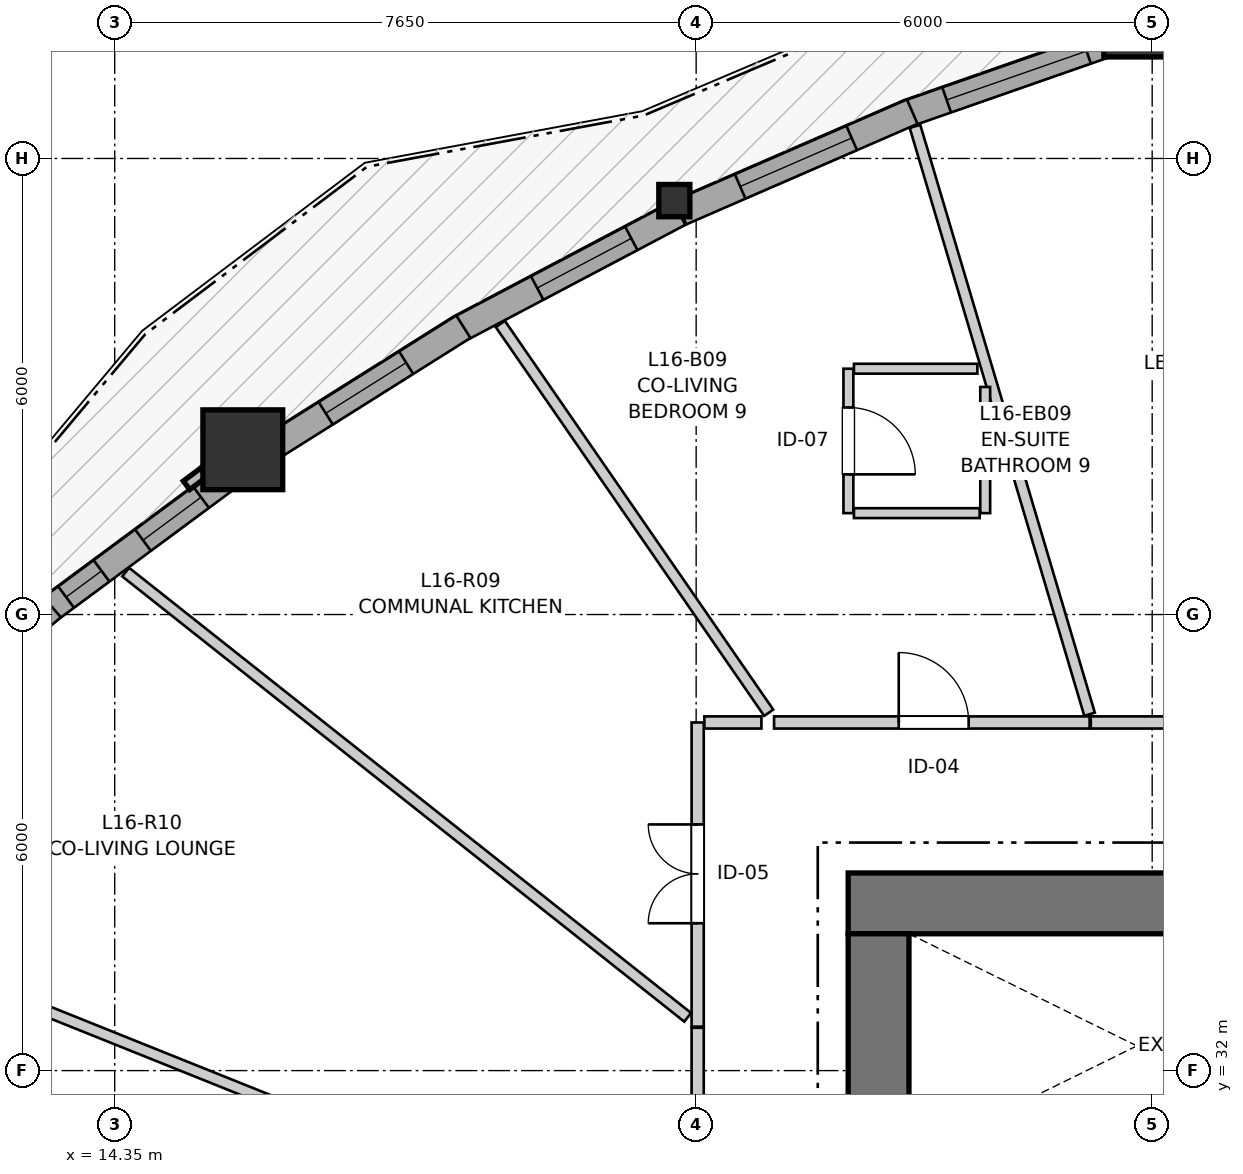
"""IFC4 building model, lengths in metres.
Left out: names, types, materials, properties, quantities, classifications, styles, units other than length and angle.
Written with IfcOpenShell. Run it as: python <this file> out.ifc"""

import sys

from ifc_helpers import new_model, si_unit, direction, frame, frame_2d, origin, origin_2d, place, context, subcontext, project, spatial, rectangle, i_section, extrude, source, transform, mapped, element, fill, save


model = new_model("IFC4")
c1 = context("Model", 3, precision=1e-05, world=origin(), true_north=direction((0.0, 1.0)))
c2 = subcontext(c1, "Body", "Model", "MODEL_VIEW")
j1 = project(units=[si_unit("LENGTHUNIT", "METRE"), si_unit("PLANEANGLEUNIT", "RADIAN")], contexts=[c1])
p1 = place(None, origin())
s1 = spatial("IfcSite", under=j1, at=p1, CompositionType="ELEMENT")
p2 = place(p1, origin())
s2 = spatial("IfcBuilding", under=s1, at=p2, CompositionType="ELEMENT")
p3 = place(p2, frame((0.0, 0.0, 55.8)))
s3 = spatial("IfcBuildingStorey", under=s2, at=p3, CompositionType="ELEMENT", Elevation=55.8)
p4 = place(p3, frame((36.7, 34.2, 0.0), z_axis=(0.0, 0.0, 1.0), x_axis=(-1.0, 0.0, 0.0)))
e1 = element("IfcWall", 1, at=p4, inside=s3, PredefinedType="SHEAR", context=c2, shape_type="SweptSolid", body=[
    extrude(rectangle(XDim=12.7, YDim=0.8, at=frame_2d((6.35, 0.0))), origin(), (0.0, 0.0, 1.0), 2.94),
])
p5 = place(p3, frame((24.4, 33.8, 0.0), z_axis=(0.0, 0.0, 1.0), x_axis=(0.0, -1.0, 0.0)))
e2 = element("IfcWall", 2, at=p5, inside=s3, PredefinedType="SHEAR", context=c2, shape_type="SweptSolid", body=[
    extrude(rectangle(XDim=15.6, YDim=0.8, at=frame_2d((7.8, 0.0))), origin(), (0.0, 0.0, 1.0), 2.94),
])
p6 = place(p5, frame((7.05, 0.0, 0.0)))
e3 = element("IfcOpeningElement", 3, at=p6, cuts=e2, PredefinedType="OPENING", context=c2, shape_type="SweptSolid", body=[
    extrude(rectangle(XDim=1.5, YDim=2.15, at=frame_2d((0.75, 1.075))), frame((0.0, 0.41, 0.0), z_axis=(0.0, -1.0, 0.0), x_axis=(1.0, 0.0, 0.0)), (0.0, 0.0, 1.0), 0.82),
])
p7 = place(p5, frame((3.52, 0.0, 0.0)))
e4 = element("IfcOpeningElement", 4, at=p7, cuts=e2, PredefinedType="OPENING", context=c2, shape_type="SweptSolid", body=[
    extrude(rectangle(XDim=0.86, YDim=2.05, at=frame_2d((0.43, 1.025))), frame((0.0, 0.41, 0.0), z_axis=(0.0, -1.0, 0.0), x_axis=(1.0, 0.0, 0.0)), (0.0, 0.0, 1.0), 0.82),
])
p8 = place(p5, frame((11.22, 0.0, 0.0)))
e5 = element("IfcOpeningElement", 5, at=p8, cuts=e2, PredefinedType="OPENING", context=c2, shape_type="SweptSolid", body=[
    extrude(rectangle(XDim=0.86, YDim=2.05, at=frame_2d((0.43, 1.025))), frame((0.0, 0.41, 0.0), z_axis=(0.0, -1.0, 0.0), x_axis=(1.0, 0.0, 0.0)), (0.0, 0.0, 1.0), 0.82),
])
m1 = source(origin(), c2, "Body", "SweptSolid", [
    extrude(rectangle(XDim=1.05, YDim=1.05, at=origin_2d()), origin(), (0.0, 0.0, 1.0), 2.94),
])
p9 = place(p3, frame((27.888, 45.861, 0.0), z_axis=(0.0, 0.0, 1.0), x_axis=(1.0, 0.0, 0.0)))
e6 = element("IfcColumn", 6, at=p9, inside=s3, PredefinedType="COLUMN", context=c2, shape_type="MappedRepresentation", body=[
    mapped(m1, transform((0.0, 0.0, 0.0), x_axis=(1.0, 0.0, 0.0), y_axis=(0.0, 1.0, 0.0), z_axis=(0.0, 0.0, 1.0), scale=1.0)),
])
m2 = source(origin(), c2, "Body", "SweptSolid", [
    extrude(i_section(OverallWidth=0.409, OverallDepth=0.425, WebThickness=0.03, FlangeThickness=0.048, FilletRadius=0.015, at=origin_2d()), origin(), (0.0, 0.0, 1.0), 2.94),
])
p10 = place(p3, frame((21.713, 43.446, 0.0), z_axis=(0.0, 0.0, 1.0), x_axis=(1.0, 0.0, 0.0)))
e7 = element("IfcColumn", 7, at=p10, inside=s3, PredefinedType="PILASTER", context=c2, shape_type="MappedRepresentation", body=[
    mapped(m2, transform((0.0, 0.0, 0.0), x_axis=(1.0, 0.0, 0.0), y_axis=(0.0, 1.0, 0.0), z_axis=(0.0, 0.0, 1.0), scale=1.0)),
])
p11 = place(p3, frame((16.035, 40.168, 0.0), z_axis=(0.0, 0.0, 1.0), x_axis=(1.0, 0.0, 0.0)))
e8 = element("IfcColumn", 8, at=p11, inside=s3, PredefinedType="COLUMN", context=c2, shape_type="MappedRepresentation", body=[
    mapped(m1, transform((0.0, 0.0, 0.0), x_axis=(1.0, 0.0, 0.0), y_axis=(0.0, 1.0, 0.0), z_axis=(0.0, 0.0, 1.0), scale=1.0)),
])
p12 = place(p3, frame((27.663, 45.596, 0.0), z_axis=(0.0, 0.0, 1.0), x_axis=(-0.944134113087, -0.329561491236, 0.0)))
e9 = element("IfcWall", 9, at=p12, inside=s3, PredefinedType="SOLIDWALL", context=c2, shape_type="SweptSolid", body=[
    extrude(rectangle(XDim=3.074, YDim=0.35, at=frame_2d((1.537, 0.0))), origin(), (0.0, 0.0, 1.0), 2.42),
])
p13 = place(p12, frame((0.557, 0.0, 0.82)))
e10 = element("IfcOpeningElement", 10, at=p13, cuts=e9, PredefinedType="OPENING", context=c2, shape_type="SweptSolid", body=[
    extrude(rectangle(XDim=1.95, YDim=1.4, at=frame_2d((0.975, 0.7))), frame((0.0, 0.185, 0.0), z_axis=(0.0, -1.0, 0.0), x_axis=(1.0, 0.0, 0.0)), (0.0, 0.0, 1.0), 0.37),
])
p14 = place(p3, frame((24.843, 44.615, 0.0), z_axis=(0.0, 0.0, 1.0), x_axis=(-0.917119193404, -0.398613076918, 0.0)))
e11 = element("IfcWall", 11, at=p14, inside=s3, PredefinedType="SOLIDWALL", context=c2, shape_type="SweptSolid", body=[
    extrude(rectangle(XDim=3.317, YDim=0.35, at=frame_2d((1.659, 0.0))), origin(), (0.0, 0.0, 1.0), 2.42),
])
p15 = place(p14, frame((0.869, 0.0, 0.82)))
e12 = element("IfcOpeningElement", 12, at=p15, cuts=e11, PredefinedType="OPENING", context=c2, shape_type="SweptSolid", body=[
    extrude(rectangle(XDim=1.6, YDim=1.35, at=frame_2d((0.8, 0.675))), frame((0.0, 0.185, 0.0), z_axis=(0.0, -1.0, 0.0), x_axis=(1.0, 0.0, 0.0)), (0.0, 0.0, 1.0), 0.37),
])
p16 = place(p3, frame((21.777, 43.281, 0.0), z_axis=(0.0, 0.0, 1.0), x_axis=(-0.884381357857, -0.466765052113, 0.0)))
e13 = element("IfcWall", 13, at=p16, inside=s3, PredefinedType="SOLIDWALL", context=c2, shape_type="SweptSolid", body=[
    extrude(rectangle(XDim=3.298, YDim=0.35, at=frame_2d((1.649, 0.0))), origin(), (0.0, 0.0, 1.0), 2.42),
])
p17 = place(p16, frame((0.713, 0.0, 0.82)))
e14 = element("IfcOpeningElement", 14, at=p17, cuts=e13, PredefinedType="OPENING", context=c2, shape_type="SweptSolid", body=[
    extrude(rectangle(XDim=1.4, YDim=1.35, at=frame_2d((0.7, 0.675))), frame((0.0, 0.185, 0.0), z_axis=(0.0, -1.0, 0.0), x_axis=(1.0, 0.0, 0.0)), (0.0, 0.0, 1.0), 0.37),
])
p18 = place(p3, frame((18.937, 41.787, 0.0), z_axis=(0.0, 0.0, 1.0), x_axis=(-0.84639489148, -0.532555807101, 0.0)))
e15 = element("IfcWall", 15, at=p18, inside=s3, PredefinedType="SOLIDWALL", context=c2, shape_type="SweptSolid", body=[
    extrude(rectangle(XDim=3.018, YDim=0.35, at=frame_2d((1.509, 0.0))), origin(), (0.0, 0.0, 1.0), 2.42),
])
p19 = place(p18, frame((0.889, 0.0, 0.82)))
e16 = element("IfcOpeningElement", 16, at=p19, cuts=e15, PredefinedType="OPENING", context=c2, shape_type="SweptSolid", body=[
    extrude(rectangle(XDim=1.25, YDim=1.35, at=frame_2d((0.625, 0.675))), frame((0.0, 0.185, 0.0), z_axis=(0.0, -1.0, 0.0), x_axis=(1.0, 0.0, 0.0)), (0.0, 0.0, 1.0), 0.37),
])
p20 = place(p3, frame((15.898, 39.849, 0.0), z_axis=(0.0, 0.0, 1.0), x_axis=(-0.803775013519, -0.594933380844, 0.0)))
e17 = element("IfcWall", 17, at=p20, inside=s3, PredefinedType="SOLIDWALL", context=c2, shape_type="SweptSolid", body=[
    extrude(rectangle(XDim=3.037, YDim=0.35, at=frame_2d((1.519, 0.0))), origin(), (0.0, 0.0, 1.0), 2.42),
])
p21 = place(p20, frame((0.513, 0.0, 0.82)))
e18 = element("IfcOpeningElement", 18, at=p21, cuts=e17, PredefinedType="OPENING", context=c2, shape_type="SweptSolid", body=[
    extrude(rectangle(XDim=0.95, YDim=1.35, at=frame_2d((0.475, 0.675))), frame((0.0, 0.185, 0.0), z_axis=(0.0, -1.0, 0.0), x_axis=(1.0, 0.0, 0.0)), (0.0, 0.0, 1.0), 0.37),
])
p22 = place(p20, frame((2.142, 0.0, 0.82)))
e19 = element("IfcOpeningElement", 19, at=p22, cuts=e17, PredefinedType="OPENING", context=c2, shape_type="SweptSolid", body=[
    extrude(rectangle(XDim=0.58, YDim=1.35, at=frame_2d((0.29, 0.675))), frame((0.0, 0.185, 0.0), z_axis=(0.0, -1.0, 0.0), x_axis=(1.0, 0.0, 0.0)), (0.0, 0.0, 1.0), 0.37),
])
p23 = place(p3, frame((13.526, 38.097, 0.0), z_axis=(0.0, 0.0, 1.0), x_axis=(-0.757460843483, -0.652880594435, 0.0)))
e20 = element("IfcWall", 20, at=p23, inside=s3, PredefinedType="SOLIDWALL", context=c2, shape_type="SweptSolid", body=[
    extrude(rectangle(XDim=3.355, YDim=0.35, at=frame_2d((1.677, 0.0))), origin(), (0.0, 0.0, 1.0), 2.42),
])
p24 = place(p23, frame((0.962, 0.0, 0.82)))
e21 = element("IfcOpeningElement", 21, at=p24, cuts=e20, PredefinedType="OPENING", context=c2, shape_type="SweptSolid", body=[
    extrude(rectangle(XDim=1.45, YDim=1.25, at=frame_2d((0.725, 0.625))), frame((0.0, 0.185, 0.0), z_axis=(0.0, -1.0, 0.0), x_axis=(1.0, 0.0, 0.0)), (0.0, 0.0, 1.0), 0.37),
])
p25 = place(p3, frame((27.192, 36.58, 0.0), z_axis=(0.0, 0.0, 1.0), x_axis=(1.0, 0.0, 0.0)))
e22 = element("IfcWall", 22, at=p25, inside=s3, PredefinedType="PARTITIONING", context=c2, shape_type="SweptSolid", body=[
    extrude(rectangle(XDim=4.339, YDim=0.16, at=frame_2d((2.169, 0.0))), origin(), (0.0, 0.0, 1.0), 2.94),
])
p26 = place(p25, frame((1.52, 0.0, 0.0)))
e23 = element("IfcOpeningElement", 23, at=p26, cuts=e22, PredefinedType="OPENING", context=c2, shape_type="SweptSolid", body=[
    extrude(rectangle(XDim=1.3, YDim=2.1, at=frame_2d((0.65, 1.05))), frame((0.0, 0.09, 0.0), z_axis=(0.0, -1.0, 0.0), x_axis=(1.0, 0.0, 0.0)), (0.0, 0.0, 1.0), 0.18),
])
p27 = place(p3, frame((23.025, 36.58, 0.0), z_axis=(0.0, 0.0, 1.0), x_axis=(1.0, 0.0, 0.0)))
e24 = element("IfcWall", 24, at=p27, inside=s3, PredefinedType="PARTITIONING", context=c2, shape_type="SweptSolid", body=[
    extrude(rectangle(XDim=4.152, YDim=0.16, at=frame_2d((2.076, 0.0))), origin(), (0.0, 0.0, 1.0), 2.548),
])
p28 = place(p27, frame((1.64, 0.0, 0.0)))
e25 = element("IfcOpeningElement", 25, at=p28, cuts=e24, PredefinedType="OPENING", context=c2, shape_type="SweptSolid", body=[
    extrude(rectangle(XDim=0.92, YDim=2.1, at=frame_2d((0.46, 1.05))), frame((0.0, 0.09, 0.0), z_axis=(0.0, -1.0, 0.0), x_axis=(1.0, 0.0, 0.0)), (0.0, 0.0, 1.0), 0.18),
])
p29 = place(p3, frame((22.02, 32.578, 0.0), z_axis=(0.0, 0.0, 1.0), x_axis=(0.0, 1.0, 0.0)))
e26 = element("IfcWall", 26, at=p29, inside=s3, PredefinedType="PARTITIONING", context=c2, shape_type="SweptSolid", body=[
    extrude(rectangle(XDim=4.002, YDim=0.16, at=frame_2d((2.001, 0.0))), origin(), (0.0, 0.0, 1.0), 2.94),
])
p30 = place(p29, frame((1.361, 0.0, 0.0)))
e27 = element("IfcOpeningElement", 27, at=p30, cuts=e26, PredefinedType="OPENING", context=c2, shape_type="SweptSolid", body=[
    extrude(rectangle(XDim=1.3, YDim=2.1, at=frame_2d((0.65, 1.05))), frame((0.0, 0.09, 0.0), z_axis=(0.0, -1.0, 0.0), x_axis=(1.0, 0.0, 0.0)), (0.0, 0.0, 1.0), 0.18),
])
p31 = place(p3, frame((22.02, 29.328, 0.0), z_axis=(0.0, 0.0, 1.0), x_axis=(0.0, 1.0, 0.0)))
e28 = element("IfcWall", 28, at=p31, inside=s3, PredefinedType="PARTITIONING", context=c2, shape_type="SweptSolid", body=[
    extrude(rectangle(XDim=3.235, YDim=0.16, at=frame_2d((1.618, 0.0))), origin(), (0.0, 0.0, 1.0), 2.94),
])
p32 = place(p31, frame((0.992, 0.0, 0.0)))
e29 = element("IfcOpeningElement", 29, at=p32, cuts=e28, PredefinedType="OPENING", context=c2, shape_type="SweptSolid", body=[
    extrude(rectangle(XDim=1.3, YDim=2.1, at=frame_2d((0.65, 1.05))), frame((0.0, 0.09, 0.0), z_axis=(0.0, -1.0, 0.0), x_axis=(1.0, 0.0, 0.0)), (0.0, 0.0, 1.0), 0.18),
])
p33 = place(p3, frame((24.003, 41.234, 0.0), z_axis=(0.0, 0.0, 1.0), x_axis=(0.0, -1.0, 0.0)))
e30 = element("IfcWall", 30, at=p33, inside=s3, PredefinedType="PARTITIONING", context=c2, shape_type="SweptSolid", body=[
    extrude(rectangle(XDim=1.9, YDim=0.13, at=frame_2d((0.95, 0.0))), origin(), (0.0, 0.0, 1.0), 2.94),
])
p34 = place(p33, frame((0.51, 0.0, 0.0)))
e31 = element("IfcOpeningElement", 31, at=p34, cuts=e30, PredefinedType="OPENING", context=c2, shape_type="SweptSolid", body=[
    extrude(rectangle(XDim=0.88, YDim=2.05, at=frame_2d((0.44, 1.025))), frame((0.0, 0.075, 0.0), z_axis=(0.0, -1.0, 0.0), x_axis=(1.0, 0.0, 0.0)), (0.0, 0.0, 1.0), 0.15),
])
p35 = place(p3, frame((9.646, 34.312, 0.0), z_axis=(0.0, 0.0, 1.0), x_axis=(0.928010757454, -0.372553397581, 0.0)))
e32 = element("IfcWall", 32, at=p35, inside=s3, PredefinedType="PARTITIONING", context=c2, shape_type="SweptSolid", body=[
    extrude(rectangle(XDim=13.21, YDim=0.145, at=frame_2d((6.605, 0.0))), origin(), (0.0, 0.0, 1.0), 2.94),
])
p36 = place(p3, frame((14.494, 38.558, 0.0), z_axis=(0.0, 0.0, 1.0), x_axis=(0.783879440631, -0.620913055552, 0.0)))
e33 = element("IfcWall", 33, at=p36, inside=s3, PredefinedType="PARTITIONING", context=c2, shape_type="SweptSolid", body=[
    extrude(rectangle(XDim=9.434, YDim=0.145, at=frame_2d((4.717, 0.0))), origin(), (0.0, 0.0, 1.0), 2.94),
])
p37 = place(p3, frame((24.879, 44.422, 0.0), z_axis=(0.0, 0.0, 1.0), x_axis=(0.284634354208, -0.958636158511, 0.0)))
e34 = element("IfcWall", 34, at=p37, inside=s3, PredefinedType="PARTITIONING", context=c2, shape_type="SweptSolid", body=[
    extrude(rectangle(XDim=8.068, YDim=0.145, at=frame_2d((4.034, 0.0))), origin(), (0.0, 0.0, 1.0), 2.94),
])
p38 = place(p3, frame((19.423, 41.823, 0.0), z_axis=(0.0, 0.0, 1.0), x_axis=(0.568159686118, -0.822918325881, 0.0)))
e35 = element("IfcWall", 35, at=p38, inside=s3, PredefinedType="PARTITIONING", context=c2, shape_type="SweptSolid", body=[
    extrude(rectangle(XDim=6.216, YDim=0.145, at=frame_2d((3.108, 0.0))), origin(), (0.0, 0.0, 1.0), 2.94),
])
p39 = place(p3, frame((25.803, 39.334, 0.0), z_axis=(0.0, 0.0, 1.0), x_axis=(0.0, 1.0, 0.0)))
e36 = element("IfcWall", 36, at=p39, inside=s3, PredefinedType="PARTITIONING", context=c2, shape_type="SweptSolid", body=[
    extrude(rectangle(XDim=1.66, YDim=0.13, at=frame_2d((0.83, 0.0))), origin(), (0.0, 0.0, 1.0), 2.94),
])
p40 = place(p3, frame((24.076, 41.234, 0.0), z_axis=(0.0, 0.0, 1.0), x_axis=(1.0, 0.0, 0.0)))
e37 = element("IfcWall", 37, at=p40, inside=s3, PredefinedType="PARTITIONING", context=c2, shape_type="SweptSolid", body=[
    extrude(rectangle(XDim=1.624, YDim=0.13, at=frame_2d((0.812, 0.0))), origin(), (0.0, 0.0, 1.0), 2.94),
])
p41 = place(p3, frame((24.076, 39.334, 0.0), z_axis=(0.0, 0.0, 1.0), x_axis=(1.0, 0.0, 0.0)))
e38 = element("IfcWall", 38, at=p41, inside=s3, PredefinedType="PARTITIONING", context=c2, shape_type="SweptSolid", body=[
    extrude(rectangle(XDim=1.654, YDim=0.13, at=frame_2d((0.827, 0.0))), origin(), (0.0, 0.0, 1.0), 2.94),
])
p42 = place(p3, frame((22.108, 36.58, 0.0), z_axis=(0.0, 0.0, 1.0), x_axis=(1.0, 0.0, 0.0)))
e39 = element("IfcWall", 39, at=p42, inside=s3, PredefinedType="PARTITIONING", context=c2, shape_type="SweptSolid", body=[
    extrude(rectangle(XDim=0.751, YDim=0.16, at=frame_2d((0.375, 0.0))), origin(), (0.0, 0.0, 1.0), 2.94),
])
m3 = source(origin(), c2, "Body", "SweptSolid", [
    extrude(rectangle(XDim=1.95, YDim=1.4, at=frame_2d((0.975, 0.7))), frame((0.0, 0.03, 0.0), z_axis=(0.0, -1.0, 0.0), x_axis=(1.0, 0.0, 0.0)), (0.0, 0.0, 1.0), 0.06),
])
p43 = place(p13, origin())
e40 = element("IfcWindow", 40, at=p43, inside=s3, PartitioningType="SINGLE_PANEL", PredefinedType="WINDOW", context=c2, shape_type="MappedRepresentation", body=[
    mapped(m3, transform((0.0, 0.0, 0.0), x_axis=(1.0, 0.0, 0.0), y_axis=(0.0, 1.0, 0.0), z_axis=(0.0, 0.0, 1.0), scale=1.0)),
])
fill(e10, e40)
m4 = source(origin(), c2, "Body", "SweptSolid", [
    extrude(rectangle(XDim=1.6, YDim=1.35, at=frame_2d((0.8, 0.675))), frame((0.0, 0.03, 0.0), z_axis=(0.0, -1.0, 0.0), x_axis=(1.0, 0.0, 0.0)), (0.0, 0.0, 1.0), 0.06),
])
p44 = place(p15, origin())
e41 = element("IfcWindow", 41, at=p44, inside=s3, PartitioningType="SINGLE_PANEL", PredefinedType="WINDOW", context=c2, shape_type="MappedRepresentation", body=[
    mapped(m4, transform((0.0, 0.0, 0.0), x_axis=(1.0, 0.0, 0.0), y_axis=(0.0, 1.0, 0.0), z_axis=(0.0, 0.0, 1.0), scale=1.0)),
])
fill(e12, e41)
m5 = source(origin(), c2, "Body", "SweptSolid", [
    extrude(rectangle(XDim=1.4, YDim=1.35, at=frame_2d((0.7, 0.675))), frame((0.0, 0.03, 0.0), z_axis=(0.0, -1.0, 0.0), x_axis=(1.0, 0.0, 0.0)), (0.0, 0.0, 1.0), 0.06),
])
p45 = place(p17, origin())
e42 = element("IfcWindow", 42, at=p45, inside=s3, PartitioningType="SINGLE_PANEL", PredefinedType="WINDOW", context=c2, shape_type="MappedRepresentation", body=[
    mapped(m5, transform((0.0, 0.0, 0.0), x_axis=(1.0, 0.0, 0.0), y_axis=(0.0, 1.0, 0.0), z_axis=(0.0, 0.0, 1.0), scale=1.0)),
])
fill(e14, e42)
m6 = source(origin(), c2, "Body", "SweptSolid", [
    extrude(rectangle(XDim=1.25, YDim=1.35, at=frame_2d((0.625, 0.675))), frame((0.0, 0.03, 0.0), z_axis=(0.0, -1.0, 0.0), x_axis=(1.0, 0.0, 0.0)), (0.0, 0.0, 1.0), 0.06),
])
p46 = place(p19, origin())
e43 = element("IfcWindow", 43, at=p46, inside=s3, PartitioningType="SINGLE_PANEL", PredefinedType="WINDOW", context=c2, shape_type="MappedRepresentation", body=[
    mapped(m6, transform((0.0, 0.0, 0.0), x_axis=(1.0, 0.0, 0.0), y_axis=(0.0, 1.0, 0.0), z_axis=(0.0, 0.0, 1.0), scale=1.0)),
])
fill(e16, e43)
m7 = source(origin(), c2, "Body", "SweptSolid", [
    extrude(rectangle(XDim=0.95, YDim=1.35, at=frame_2d((0.475, 0.675))), frame((0.0, 0.03, 0.0), z_axis=(0.0, -1.0, 0.0), x_axis=(1.0, 0.0, 0.0)), (0.0, 0.0, 1.0), 0.06),
])
p47 = place(p21, origin())
e44 = element("IfcWindow", 44, at=p47, inside=s3, PartitioningType="SINGLE_PANEL", PredefinedType="WINDOW", context=c2, shape_type="MappedRepresentation", body=[
    mapped(m7, transform((0.0, 0.0, 0.0), x_axis=(1.0, 0.0, 0.0), y_axis=(0.0, 1.0, 0.0), z_axis=(0.0, 0.0, 1.0), scale=1.0)),
])
fill(e18, e44)
m8 = source(origin(), c2, "Body", "SweptSolid", [
    extrude(rectangle(XDim=0.58, YDim=1.35, at=frame_2d((0.29, 0.675))), frame((0.0, 0.03, 0.0), z_axis=(0.0, -1.0, 0.0), x_axis=(1.0, 0.0, 0.0)), (0.0, 0.0, 1.0), 0.06),
])
p48 = place(p22, origin())
e45 = element("IfcWindow", 45, at=p48, inside=s3, PartitioningType="SINGLE_PANEL", PredefinedType="WINDOW", context=c2, shape_type="MappedRepresentation", body=[
    mapped(m8, transform((0.0, 0.0, 0.0), x_axis=(1.0, 0.0, 0.0), y_axis=(0.0, 1.0, 0.0), z_axis=(0.0, 0.0, 1.0), scale=1.0)),
])
fill(e19, e45)
m9 = source(origin(), c2, "Body", "SweptSolid", [
    extrude(rectangle(XDim=0.92, YDim=2.1, at=frame_2d((0.46, 1.05))), frame((0.0, 0.025, 0.0), z_axis=(0.0, -1.0, 0.0), x_axis=(1.0, 0.0, 0.0)), (0.0, 0.0, 1.0), 0.05),
])
p49 = place(p28, origin())
e46 = element("IfcDoor", 46, at=p49, inside=s3, OperationType="SINGLE_SWING_LEFT", PredefinedType="DOOR", context=c2, shape_type="MappedRepresentation", body=[
    mapped(m9, transform((0.0, 0.0, 0.0), x_axis=(1.0, 0.0, 0.0), y_axis=(0.0, 1.0, 0.0), z_axis=(0.0, 0.0, 1.0), scale=1.0)),
])
fill(e25, e46)
m10 = source(origin(), c2, "Body", "SweptSolid", [
    extrude(rectangle(XDim=1.3, YDim=2.1, at=frame_2d((0.65, 1.05))), frame((0.0, 0.025, 0.0), z_axis=(0.0, -1.0, 0.0), x_axis=(1.0, 0.0, 0.0)), (0.0, 0.0, 1.0), 0.05),
])
p50 = place(p30, origin())
e47 = element("IfcDoor", 47, at=p50, inside=s3, OperationType="DOUBLE_DOOR_SINGLE_SWING", PredefinedType="DOOR", context=c2, shape_type="MappedRepresentation", body=[
    mapped(m10, transform((0.0, 0.0, 0.0), x_axis=(1.0, 0.0, 0.0), y_axis=(0.0, 1.0, 0.0), z_axis=(0.0, 0.0, 1.0), scale=1.0)),
])
fill(e27, e47)
m11 = source(origin(), c2, "Body", "SweptSolid", [
    extrude(rectangle(XDim=0.88, YDim=2.05, at=frame_2d((0.44, 1.025))), frame((0.0, 0.025, 0.0), z_axis=(0.0, -1.0, 0.0), x_axis=(1.0, 0.0, 0.0)), (0.0, 0.0, 1.0), 0.05),
])
p51 = place(p34, origin())
e48 = element("IfcDoor", 48, at=p51, inside=s3, OperationType="SINGLE_SWING_RIGHT", PredefinedType="DOOR", context=c2, shape_type="MappedRepresentation", body=[
    mapped(m11, transform((0.0, 0.0, 0.0), x_axis=(1.0, 0.0, 0.0), y_axis=(0.0, 1.0, 0.0), z_axis=(0.0, 0.0, 1.0), scale=1.0)),
])
fill(e31, e48)
save(model, sys.argv[1])
